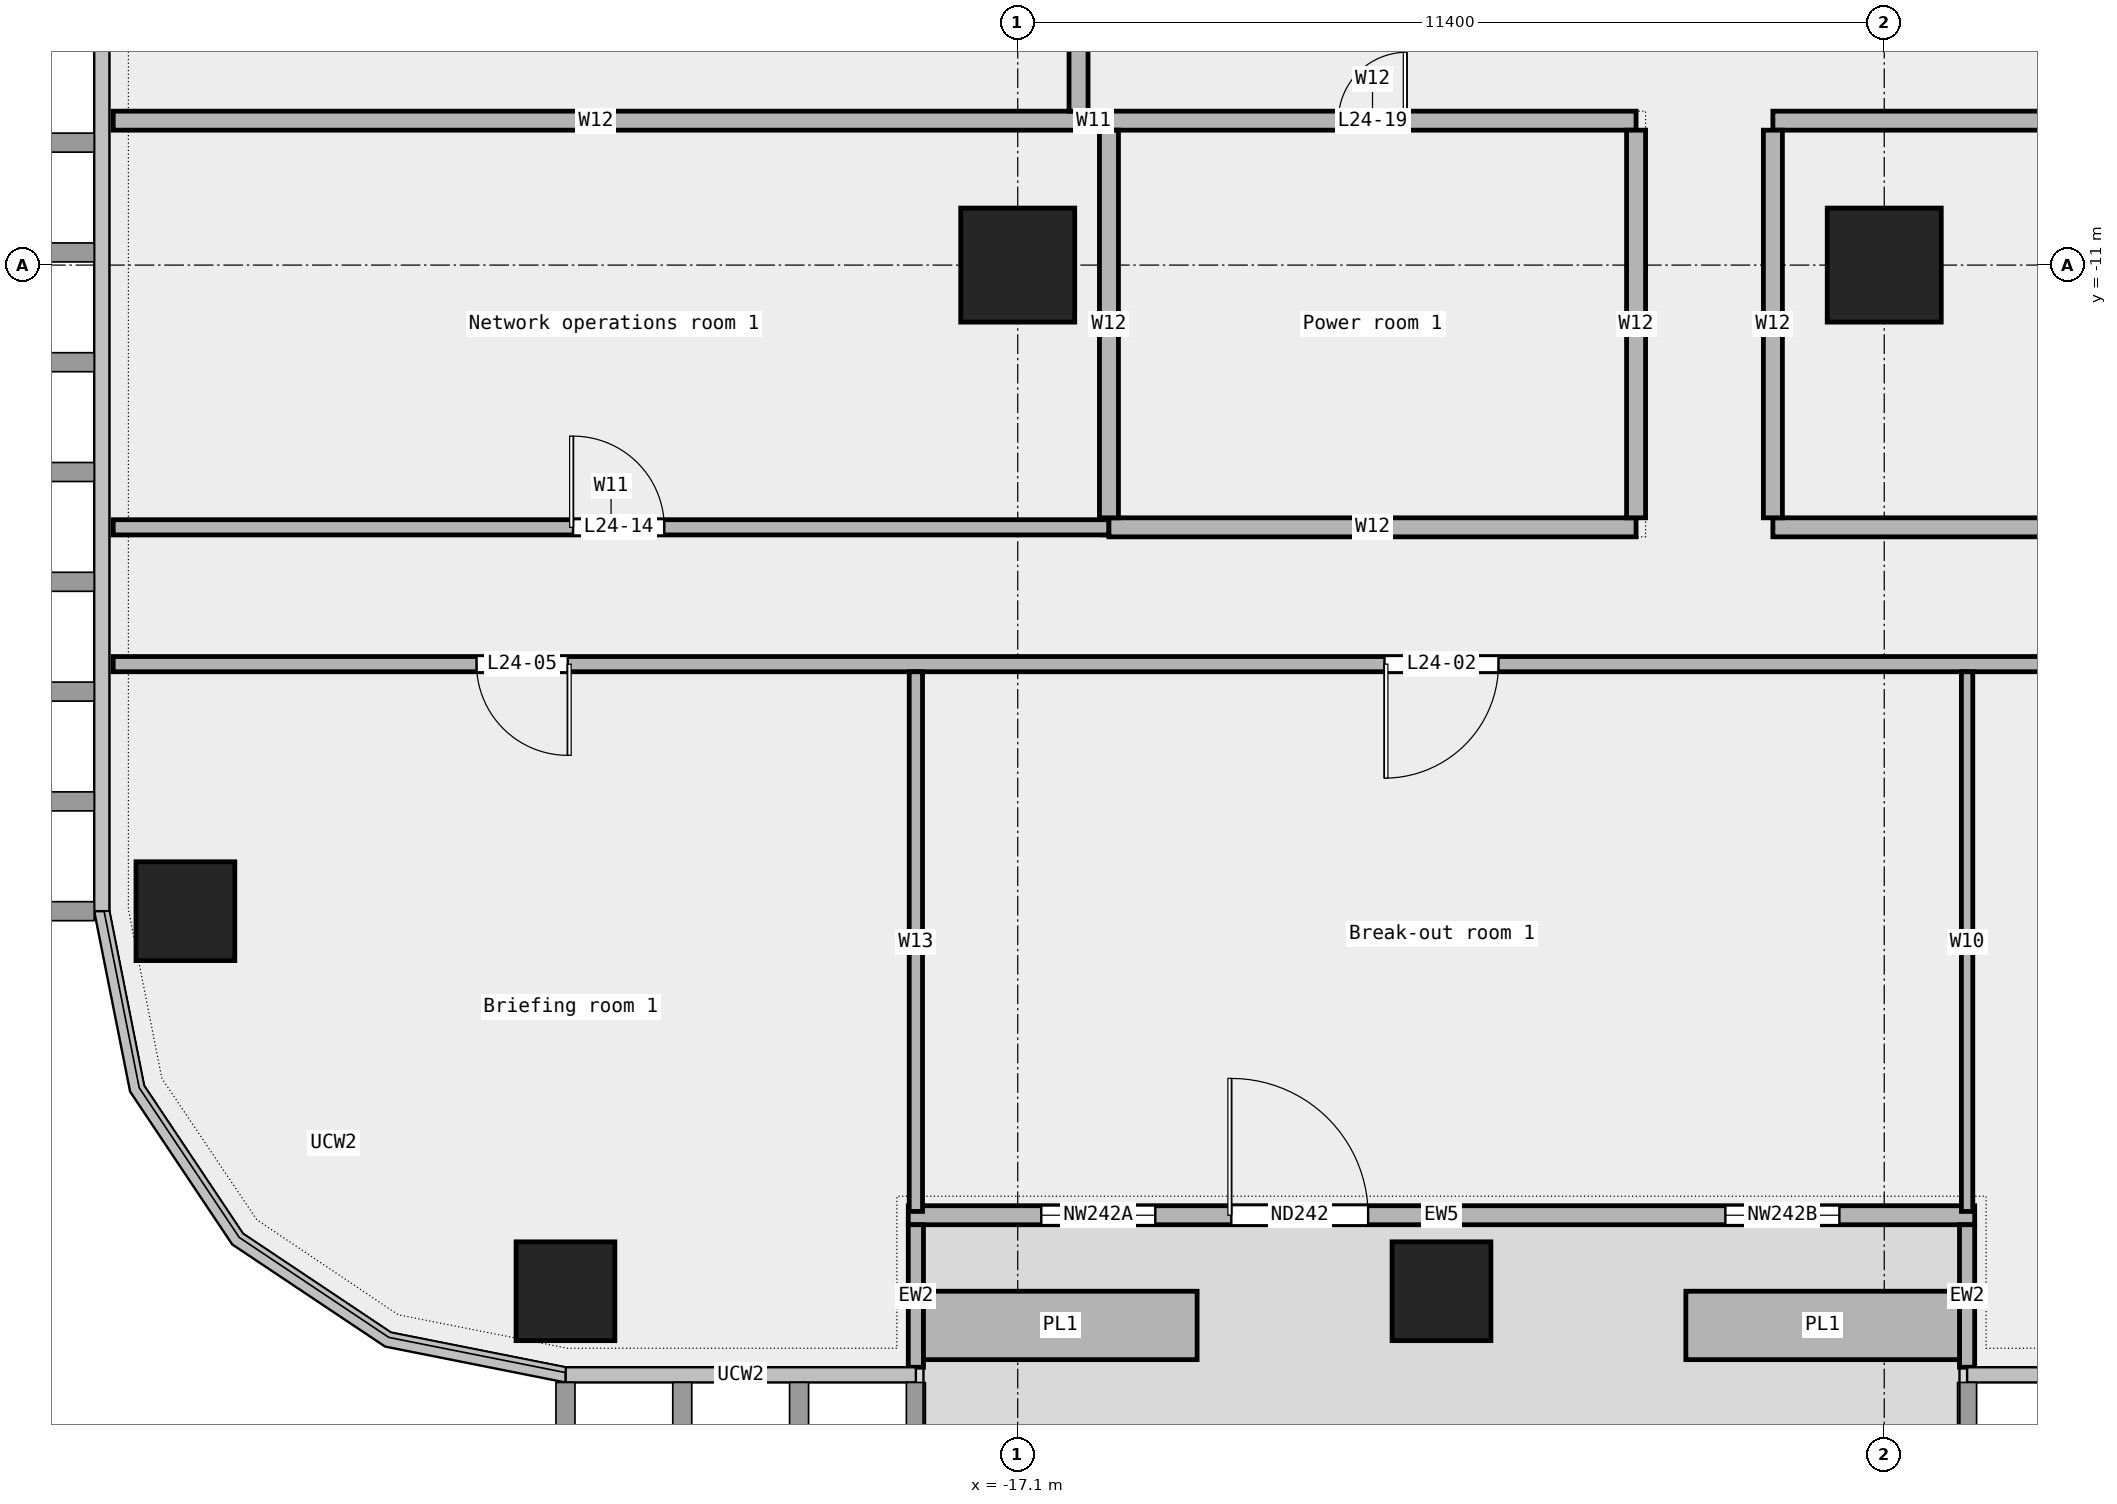
"""IFC4 building model, lengths in metres.
Left out: names, types, materials, properties, quantities, classifications, styles, units other than length and angle.
Written with IfcOpenShell. Run it as: python <this file> out.ifc"""

import sys

from ifc_helpers import new_model, si_unit, direction, frame, frame_2d, origin, origin_2d, place, context, subcontext, project, spatial, rectangle, extrude, element, fill, save


model = new_model("IFC4")
c1 = context("Model", 3, precision=1e-05, world=origin(), true_north=direction((0.0, 1.0)))
c2 = subcontext(c1, "Body", "Model", "MODEL_VIEW")
j1 = project(units=[si_unit("LENGTHUNIT", "METRE"), si_unit("PLANEANGLEUNIT", "RADIAN")], contexts=[c1])
p1 = place(None, origin())
s1 = spatial("IfcSite", under=j1, at=p1, CompositionType="ELEMENT")
p2 = place(p1, origin())
s2 = spatial("IfcBuilding", under=s1, at=p2, CompositionType="ELEMENT")
p3 = place(p2, frame((0.0, 0.0, 121.6)))
s3 = spatial("IfcBuildingStorey", under=s2, at=p3, CompositionType="ELEMENT", Elevation=121.6)
for number, where, z_axis, x_axis in (
    (1, (-23.05, -24.5, 0.0), (0.0, 0.0, 1.0), (1.0, 0.0, 0.0)),
    (2, (-11.525, -24.5, 0.0), (0.0, 0.0, 1.0), (1.0, 0.0, 0.0)),
    (3, (-28.05, -19.5, 0.0), (0.0, 0.0, 1.0), (1.0, 0.0, 0.0)),
):
    element("IfcColumn", number, at=place(p3, frame(where, z_axis=z_axis, x_axis=x_axis)), inside=s3, PredefinedType="COLUMN", context=c2, shape_type="SweptSolid", body=[
        extrude(rectangle(XDim=1.3, YDim=1.3, at=origin_2d()), origin(), (0.0, 0.0, 1.0), 4.05),
    ])
for number, where, z_axis, x_axis in (
    (4, (-17.1, -11.0, 0.0), (0.0, 0.0, 1.0), (1.0, 0.0, 0.0)),
    (5, (-5.7, -11.0, 0.0), (0.0, 0.0, 1.0), (1.0, 0.0, 0.0)),
):
    element("IfcColumn", number, at=place(p3, frame(where, z_axis=z_axis, x_axis=x_axis)), inside=s3, PredefinedType="COLUMN", context=c2, shape_type="SweptSolid", body=[
        extrude(rectangle(XDim=1.5, YDim=1.5, at=origin_2d()), origin(), (0.0, 0.0, 1.0), 4.05),
    ])
p4 = place(p3, frame((-18.54, -23.5, 0.0), z_axis=(0.0, 0.0, 1.0), x_axis=(1.0, 0.0, 0.0)))
e6 = element("IfcWall", 6, at=p4, inside=s3, PredefinedType="STANDARD", context=c2, shape_type="SweptSolid", body=[
    extrude(rectangle(XDim=14.03, YDim=0.25, at=frame_2d((7.015, 0.0))), origin(), (0.0, 0.0, 1.0), 4.05),
])
p5 = place(p4, frame((1.75, 0.0, 0.45)))
e7 = element("IfcOpeningElement", 7, at=p5, cuts=e6, PredefinedType="OPENING", context=c2, shape_type="SweptSolid", body=[
    extrude(rectangle(XDim=1.5, YDim=3.0, at=frame_2d((0.75, 1.5))), frame((0.0, 0.137, 0.0), z_axis=(0.0, -1.0, 0.0), x_axis=(1.0, 0.0, 0.0)), (0.0, 0.0, 1.0), 0.274),
])
p6 = place(p4, frame((4.25, 0.0, 0.0)))
e8 = element("IfcOpeningElement", 8, at=p6, cuts=e6, PredefinedType="OPENING", context=c2, shape_type="SweptSolid", body=[
    extrude(rectangle(XDim=1.8, YDim=2.4, at=frame_2d((0.9, 1.2))), frame((0.0, 0.137, 0.0), z_axis=(0.0, -1.0, 0.0), x_axis=(1.0, 0.0, 0.0)), (0.0, 0.0, 1.0), 0.274),
])
p7 = place(p4, frame((10.75, 0.0, 0.45)))
e9 = element("IfcOpeningElement", 9, at=p7, cuts=e6, PredefinedType="OPENING", context=c2, shape_type="SweptSolid", body=[
    extrude(rectangle(XDim=1.5, YDim=3.0, at=frame_2d((0.75, 1.5))), frame((0.0, 0.137, 0.0), z_axis=(0.0, -1.0, 0.0), x_axis=(1.0, 0.0, 0.0)), (0.0, 0.0, 1.0), 0.274),
])
for number, where, z_axis, x_axis in (
    (10, (-18.44, -25.5, 0.0), (0.0, 0.0, 1.0), (0.0, 1.0, 0.0)),
    (11, (-4.61, -25.5, 0.0), (0.0, 0.0, 1.0), (0.0, 1.0, 0.0)),
):
    element("IfcWall", number, at=place(p3, frame(where, z_axis=z_axis, x_axis=x_axis)), inside=s3, PredefinedType="STANDARD", context=c2, shape_type="SweptSolid", body=[
        extrude(rectangle(XDim=1.875, YDim=0.2, at=frame_2d((0.938, 0.0))), origin(), (0.0, 0.0, 1.0), 4.05),
    ])
for number, where, z_axis, x_axis in (
    (12, (-18.34, -24.95, 0.0), (0.0, 0.0, 1.0), (1.0, 0.0, 0.0)),
    (13, (-8.31, -24.95, 0.0), (0.0, 0.0, 1.0), (1.0, 0.0, 0.0)),
):
    element("IfcWall", number, at=place(p3, frame(where, z_axis=z_axis, x_axis=x_axis)), inside=s3, PredefinedType="STANDARD", context=c2, shape_type="SweptSolid", body=[
        extrude(rectangle(XDim=3.6, YDim=0.9, at=frame_2d((1.8, 0.0))), origin(), (0.0, 0.0, 1.0), 0.7),
    ])
p8 = place(p3, frame((-29.0, -16.25, 0.0), z_axis=(0.0, 0.0, 1.0), x_axis=(1.0, 0.0, 0.0)))
e14 = element("IfcWall", 14, at=p8, inside=s3, PredefinedType="PARTITIONING", context=c2, shape_type="SweptSolid", body=[
    extrude(rectangle(XDim=58.0, YDim=0.2, at=frame_2d((29.0, 0.0))), origin(), (0.0, 0.0, 1.0), 4.05),
])
p9 = place(p8, frame((16.725, 0.0, 0.0)))
e15 = element("IfcOpeningElement", 15, at=p9, cuts=e14, PredefinedType="OPENING", context=c2, shape_type="SweptSolid", body=[
    extrude(rectangle(XDim=1.5, YDim=2.1, at=frame_2d((0.75, 1.05))), frame((0.0, 0.112, 0.0), z_axis=(0.0, -1.0, 0.0), x_axis=(1.0, 0.0, 0.0)), (0.0, 0.0, 1.0), 0.224),
])
p10 = place(p8, frame((4.78, 0.0, 0.0)))
e16 = element("IfcOpeningElement", 16, at=p10, cuts=e14, PredefinedType="OPENING", context=c2, shape_type="SweptSolid", body=[
    extrude(rectangle(XDim=1.2, YDim=2.1, at=frame_2d((0.6, 1.05))), frame((0.0, 0.112, 0.0), z_axis=(0.0, -1.0, 0.0), x_axis=(1.0, 0.0, 0.0)), (0.0, 0.0, 1.0), 0.224),
])
p11 = place(p8, frame((40.195, 0.0, 0.0)))
e17 = element("IfcOpeningElement", 17, at=p11, cuts=e14, PredefinedType="OPENING", context=c2, shape_type="SweptSolid", body=[
    extrude(rectangle(XDim=1.8, YDim=2.1, at=frame_2d((0.9, 1.05))), frame((0.0, 0.112, 0.0), z_axis=(0.0, -1.0, 0.0), x_axis=(1.0, 0.0, 0.0)), (0.0, 0.0, 1.0), 0.224),
])
p12 = place(p3, frame((-29.0, -14.45, 0.0), z_axis=(0.0, 0.0, 1.0), x_axis=(1.0, 0.0, 0.0)))
e18 = element("IfcWall", 18, at=p12, inside=s3, PredefinedType="PARTITIONING", context=c2, shape_type="SweptSolid", body=[
    extrude(rectangle(XDim=13.1, YDim=0.2, at=frame_2d((6.55, 0.0))), origin(), (0.0, 0.0, 1.0), 4.05),
])
p13 = place(p12, frame((6.05, 0.0, 0.0)))
e19 = element("IfcOpeningElement", 19, at=p13, cuts=e18, PredefinedType="OPENING", context=c2, shape_type="SweptSolid", body=[
    extrude(rectangle(XDim=1.2, YDim=2.1, at=frame_2d((0.6, 1.05))), frame((0.0, 0.112, 0.0), z_axis=(0.0, -1.0, 0.0), x_axis=(1.0, 0.0, 0.0)), (0.0, 0.0, 1.0), 0.224),
])
p14 = place(p3, frame((-15.9, -14.45, 0.0), z_axis=(0.0, 0.0, 1.0), x_axis=(1.0, 0.0, 0.0)))
e20 = element("IfcWall", 20, at=p14, inside=s3, PredefinedType="PARTITIONING", context=c2, shape_type="SweptSolid", body=[
    extrude(rectangle(XDim=6.935, YDim=0.25, at=frame_2d((3.467, 0.0))), origin(), (0.0, 0.0, 1.0), 4.05),
])
p15 = place(p3, frame((-7.165, -14.45, 0.0), z_axis=(0.0, 0.0, 1.0), x_axis=(1.0, 0.0, 0.0)))
e21 = element("IfcWall", 21, at=p15, inside=s3, PredefinedType="PARTITIONING", context=c2, shape_type="SweptSolid", body=[
    extrude(rectangle(XDim=9.465, YDim=0.25, at=frame_2d((4.732, 0.0))), origin(), (0.0, 0.0, 1.0), 4.05),
])
p16 = place(p3, frame((-16.3, -9.1, 0.0), z_axis=(0.0, 0.0, 1.0), x_axis=(1.0, 0.0, 0.0)))
e22 = element("IfcWall", 22, at=p16, inside=s3, PredefinedType="PARTITIONING", context=c2, shape_type="SweptSolid", body=[
    extrude(rectangle(XDim=0.4, YDim=0.2, at=frame_2d((0.2, 0.0))), origin(), (0.0, 0.0, 1.0), 4.05),
])
p17 = place(p3, frame((-29.0, -9.1, 0.0), z_axis=(0.0, 0.0, 1.0), x_axis=(1.0, 0.0, 0.0)))
e23 = element("IfcWall", 23, at=p17, inside=s3, PredefinedType="PARTITIONING", context=c2, shape_type="SweptSolid", body=[
    extrude(rectangle(XDim=12.7, YDim=0.25, at=frame_2d((6.35, 0.0))), origin(), (0.0, 0.0, 1.0), 4.05),
])
p18 = place(p3, frame((-15.9, -9.1, 0.0), z_axis=(0.0, 0.0, 1.0), x_axis=(1.0, 0.0, 0.0)))
e24 = element("IfcWall", 24, at=p18, inside=s3, PredefinedType="PARTITIONING", context=c2, shape_type="SweptSolid", body=[
    extrude(rectangle(XDim=6.935, YDim=0.25, at=frame_2d((3.467, 0.0))), origin(), (0.0, 0.0, 1.0), 4.05),
])
p19 = place(p18, frame((3.018, 0.0, 0.0)))
e25 = element("IfcOpeningElement", 25, at=p19, cuts=e24, PredefinedType="OPENING", context=c2, shape_type="SweptSolid", body=[
    extrude(rectangle(XDim=0.9, YDim=2.1, at=frame_2d((0.45, 1.05))), frame((0.0, 0.137, 0.0), z_axis=(0.0, -1.0, 0.0), x_axis=(1.0, 0.0, 0.0)), (0.0, 0.0, 1.0), 0.274),
])
p20 = place(p3, frame((-7.165, -9.1, 0.0), z_axis=(0.0, 0.0, 1.0), x_axis=(1.0, 0.0, 0.0)))
e26 = element("IfcWall", 26, at=p20, inside=s3, PredefinedType="PARTITIONING", context=c2, shape_type="SweptSolid", body=[
    extrude(rectangle(XDim=9.465, YDim=0.25, at=frame_2d((4.732, 0.0))), origin(), (0.0, 0.0, 1.0), 4.05),
])
p21 = place(p20, frame((4.133, 0.0, 0.0)))
e27 = element("IfcOpeningElement", 27, at=p21, cuts=e26, PredefinedType="OPENING", context=c2, shape_type="SweptSolid", body=[
    extrude(rectangle(XDim=1.2, YDim=2.1, at=frame_2d((0.6, 1.05))), frame((0.0, 0.137, 0.0), z_axis=(0.0, -1.0, 0.0), x_axis=(1.0, 0.0, 0.0)), (0.0, 0.0, 1.0), 0.274),
])
p22 = place(p3, frame((-18.44, -23.45, 0.0), z_axis=(0.0, 0.0, 1.0), x_axis=(0.0, 1.0, 0.0)))
e28 = element("IfcWall", 28, at=p22, inside=s3, PredefinedType="PARTITIONING", context=c2, shape_type="SweptSolid", body=[
    extrude(rectangle(XDim=7.1, YDim=0.175, at=frame_2d((3.55, 0.0))), origin(), (0.0, 0.0, 1.0), 4.05),
])
p23 = place(p3, frame((-16.3, -8.975, 0.0), z_axis=(0.0, 0.0, 1.0), x_axis=(0.0, 1.0, 0.0)))
e29 = element("IfcWall", 29, at=p23, inside=s3, PredefinedType="PARTITIONING", context=c2, shape_type="SweptSolid", body=[
    extrude(rectangle(XDim=8.225, YDim=0.25, at=frame_2d((4.113, 0.0))), origin(), (0.0, 0.0, 1.0), 4.05),
])
p24 = place(p23, frame((3.212, 0.0, 0.0)))
e30 = element("IfcOpeningElement", 30, at=p24, cuts=e29, PredefinedType="OPENING", context=c2, shape_type="SweptSolid", body=[
    extrude(rectangle(XDim=1.8, YDim=2.1, at=frame_2d((0.9, 1.05))), frame((0.0, 0.137, 0.0), z_axis=(0.0, -1.0, 0.0), x_axis=(1.0, 0.0, 0.0)), (0.0, 0.0, 1.0), 0.274),
])
for number, where, z_axis, x_axis in (
    (31, (-15.9, -14.325, 0.0), (0.0, 0.0, 1.0), (0.0, 1.0, 0.0)),
    (32, (-8.965, -14.325, 0.0), (0.0, 0.0, 1.0), (0.0, 1.0, 0.0)),
    (33, (-7.165, -14.325, 0.0), (0.0, 0.0, 1.0), (0.0, 1.0, 0.0)),
):
    element("IfcWall", number, at=place(p3, frame(where, z_axis=z_axis, x_axis=x_axis)), inside=s3, PredefinedType="PARTITIONING", context=c2, shape_type="SweptSolid", body=[
        extrude(rectangle(XDim=5.1, YDim=0.25, at=frame_2d((2.55, 0.0))), origin(), (0.0, 0.0, 1.0), 4.05),
    ])
p25 = place(p3, frame((-4.61, -23.45, 0.0), z_axis=(0.0, 0.0, 1.0), x_axis=(0.0, 1.0, 0.0)))
e34 = element("IfcWall", 34, at=p25, inside=s3, PredefinedType="PARTITIONING", context=c2, shape_type="SweptSolid", body=[
    extrude(rectangle(XDim=7.1, YDim=0.15, at=frame_2d((3.55, 0.0))), origin(), (0.0, 0.0, 1.0), 4.05),
])
p26 = place(p5, origin())
e35 = element("IfcWindow", 35, at=p26, inside=s3, PartitioningType="SINGLE_PANEL", PredefinedType="WINDOW", context=c2, shape_type="SweptSolid", body=[
    extrude(rectangle(XDim=1.5, YDim=3.0, at=frame_2d((0.75, 1.5))), frame((0.0, 0.03, 0.0), z_axis=(0.0, -1.0, 0.0), x_axis=(1.0, 0.0, 0.0)), (0.0, 0.0, 1.0), 0.06),
])
fill(e7, e35)
p27 = place(p6, origin())
e36 = element("IfcDoor", 36, at=p27, inside=s3, OperationType="DOUBLE_DOOR_SINGLE_SWING", PredefinedType="DOOR", context=c2, shape_type="SweptSolid", body=[
    extrude(rectangle(XDim=1.8, YDim=2.4, at=frame_2d((0.9, 1.2))), frame((0.0, 0.025, 0.0), z_axis=(0.0, -1.0, 0.0), x_axis=(1.0, 0.0, 0.0)), (0.0, 0.0, 1.0), 0.05),
])
fill(e8, e36)
p28 = place(p7, origin())
e37 = element("IfcWindow", 37, at=p28, inside=s3, PartitioningType="SINGLE_PANEL", PredefinedType="WINDOW", context=c2, shape_type="SweptSolid", body=[
    extrude(rectangle(XDim=1.5, YDim=3.0, at=frame_2d((0.75, 1.5))), frame((0.0, 0.03, 0.0), z_axis=(0.0, -1.0, 0.0), x_axis=(1.0, 0.0, 0.0)), (0.0, 0.0, 1.0), 0.06),
])
fill(e9, e37)
p29 = place(p9, origin())
e38 = element("IfcDoor", 38, at=p29, inside=s3, OperationType="DOUBLE_DOOR_SINGLE_SWING", PredefinedType="DOOR", context=c2, shape_type="SweptSolid", body=[
    extrude(rectangle(XDim=1.5, YDim=2.1, at=frame_2d((0.75, 1.05))), frame((0.0, 0.025, 0.0), z_axis=(0.0, -1.0, 0.0), x_axis=(1.0, 0.0, 0.0)), (0.0, 0.0, 1.0), 0.05),
])
fill(e15, e38)
p30 = place(p10, origin())
e39 = element("IfcDoor", 39, at=p30, inside=s3, OperationType="SINGLE_SWING_LEFT", PredefinedType="DOOR", context=c2, shape_type="SweptSolid", body=[
    extrude(rectangle(XDim=1.2, YDim=2.1, at=frame_2d((0.6, 1.05))), frame((0.0, 0.025, 0.0), z_axis=(0.0, -1.0, 0.0), x_axis=(1.0, 0.0, 0.0)), (0.0, 0.0, 1.0), 0.05),
])
fill(e16, e39)
p31 = place(p13, origin())
e40 = element("IfcDoor", 40, at=p31, inside=s3, OperationType="SINGLE_SWING_LEFT", PredefinedType="DOOR", context=c2, shape_type="SweptSolid", body=[
    extrude(rectangle(XDim=1.2, YDim=2.1, at=frame_2d((0.6, 1.05))), frame((0.0, 0.025, 0.0), z_axis=(0.0, -1.0, 0.0), x_axis=(1.0, 0.0, 0.0)), (0.0, 0.0, 1.0), 0.05),
])
fill(e19, e40)
p32 = place(p19, origin())
e41 = element("IfcDoor", 41, at=p32, inside=s3, OperationType="SINGLE_SWING_RIGHT", PredefinedType="DOOR", context=c2, shape_type="SweptSolid", body=[
    extrude(rectangle(XDim=0.9, YDim=2.1, at=frame_2d((0.45, 1.05))), frame((0.0, 0.025, 0.0), z_axis=(0.0, -1.0, 0.0), x_axis=(1.0, 0.0, 0.0)), (0.0, 0.0, 1.0), 0.05),
])
fill(e25, e41)
save(model, sys.argv[1])
